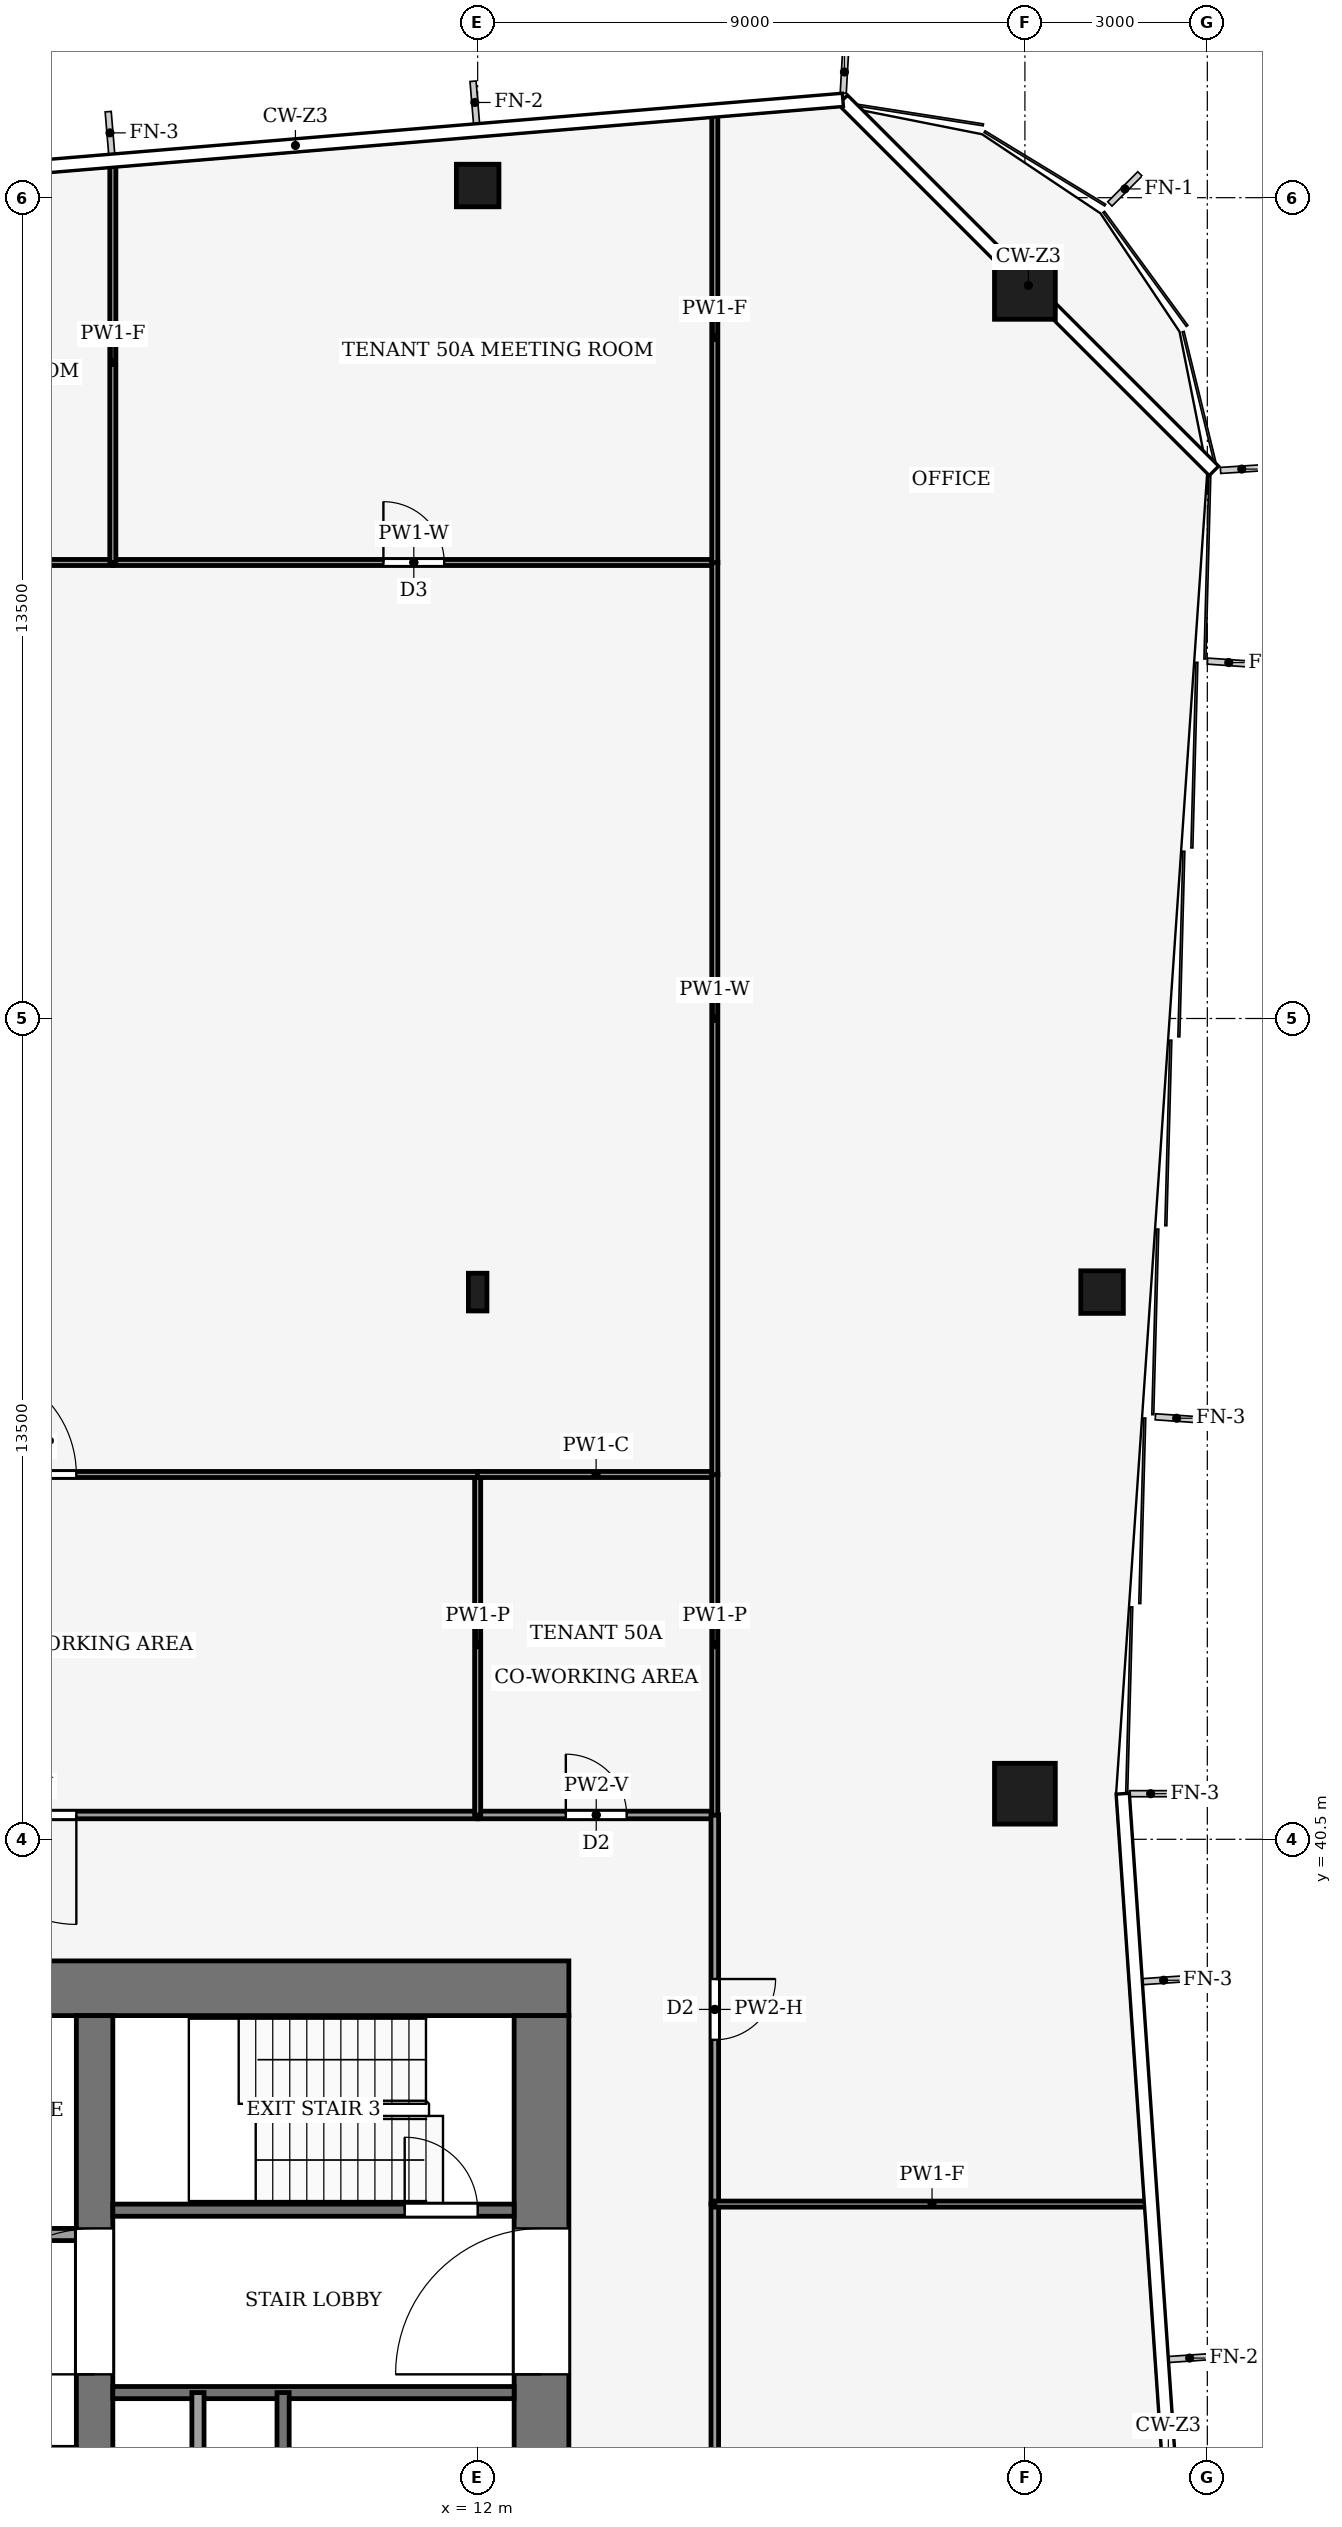
"""IFC4 building model, lengths in metres.
Left out: names, types, materials, properties, quantities, classifications, styles, units other than length and angle.
Written with IfcOpenShell. Run it as: python <this file> out.ifc"""

import sys

from ifc_helpers import new_model, si_unit, direction, frame, frame_2d, origin, origin_2d, place, context, subcontext, project, spatial, rectangle, hollow_rectangle, i_section, extrude, element, fill, save


model = new_model("IFC4")
c1 = context("Model", 3, precision=1e-05, world=origin(), true_north=direction((0.0, 1.0)))
c2 = subcontext(c1, "Body", "Model", "MODEL_VIEW")
j1 = project(units=[si_unit("LENGTHUNIT", "METRE"), si_unit("PLANEANGLEUNIT", "RADIAN")], contexts=[c1])
p1 = place(None, origin())
s1 = spatial("IfcSite", under=j1, at=p1, CompositionType="ELEMENT")
p2 = place(p1, origin())
s2 = spatial("IfcBuilding", under=s1, at=p2, CompositionType="ELEMENT")
p3 = place(p2, frame((0.0, 0.0, 218.0)))
s3 = spatial("IfcBuildingStorey", under=s2, at=p3, CompositionType="ELEMENT", Elevation=218.0)
p4 = place(p3, frame((-13.5, 38.05, -0.13), z_axis=(0.0, 0.0, 1.0), x_axis=(1.0, 0.0, 0.0)))
e1 = element("IfcWall", 1, at=p4, inside=s3, PredefinedType="SHEAR", context=c2, shape_type="SweptSolid", body=[
    extrude(rectangle(XDim=27.0, YDim=0.9, at=frame_2d((13.5, 0.0))), origin(), (0.0, 0.0, 1.0), 4.0),
])
p5 = place(p3, frame((13.05, 18.4, -0.13), z_axis=(0.0, 0.0, 1.0), x_axis=(0.0, 1.0, 0.0)))
e2 = element("IfcWall", 2, at=p5, inside=s3, PredefinedType="SHEAR", context=c2, shape_type="SweptSolid", body=[
    extrude(rectangle(XDim=19.2, YDim=0.9, at=frame_2d((9.6, 0.0))), origin(), (0.0, 0.0, 1.0), 4.0),
])
p6 = place(p5, frame((2.8, 0.0, 0.13)))
e3 = element("IfcOpeningElement", 3, at=p6, cuts=e2, PredefinedType="OPENING", context=c2, shape_type="SweptSolid", body=[
    extrude(rectangle(XDim=2.4, YDim=2.4, at=frame_2d((1.2, 1.2))), frame((0.0, 0.46, 0.0), z_axis=(0.0, -1.0, 0.0), x_axis=(1.0, 0.0, 0.0)), (0.0, 0.0, 1.0), 0.92),
])
p7 = place(p5, frame((13.3, 0.0, 0.13)))
e4 = element("IfcOpeningElement", 4, at=p7, cuts=e2, PredefinedType="OPENING", context=c2, shape_type="SweptSolid", body=[
    extrude(rectangle(XDim=2.4, YDim=2.4, at=frame_2d((1.2, 1.2))), frame((0.0, 0.46, 0.0), z_axis=(0.0, -1.0, 0.0), x_axis=(1.0, 0.0, 0.0)), (0.0, 0.0, 1.0), 0.92),
])
p8 = place(p3, frame((5.7, 18.4, -0.13), z_axis=(0.0, 0.0, 1.0), x_axis=(0.0, 1.0, 0.0)))
e5 = element("IfcWall", 5, at=p8, inside=s3, PredefinedType="SHEAR", context=c2, shape_type="SweptSolid", body=[
    extrude(rectangle(XDim=19.2, YDim=0.6, at=frame_2d((9.6, 0.0))), origin(), (0.0, 0.0, 1.0), 4.0),
])
p9 = place(p8, frame((8.35, 0.0, 0.13)))
e6 = element("IfcOpeningElement", 6, at=p9, cuts=e5, PredefinedType="OPENING", context=c2, shape_type="SweptSolid", body=[
    extrude(rectangle(XDim=0.9, YDim=2.1, at=frame_2d((0.45, 1.05))), frame((0.0, 0.31, 0.0), z_axis=(0.0, -1.0, 0.0), x_axis=(1.0, 0.0, 0.0)), (0.0, 0.0, 1.0), 0.62),
])
p10 = place(p8, frame((13.3, 0.0, 0.13)))
e7 = element("IfcOpeningElement", 7, at=p10, cuts=e5, PredefinedType="OPENING", context=c2, shape_type="SweptSolid", body=[
    extrude(rectangle(XDim=2.4, YDim=2.4, at=frame_2d((1.2, 1.2))), frame((0.0, 0.31, 0.0), z_axis=(0.0, -1.0, 0.0), x_axis=(1.0, 0.0, 0.0)), (0.0, 0.0, 1.0), 0.62),
])
for number, where, z_axis, x_axis in (
    (8, (21.0, 66.0, 0.0), (0.0, 0.0, 1.0), (1.0, 0.0, 0.0)),
    (9, (21.0, 41.25, 0.0), (0.0, 0.0, 1.0), (1.0, 0.0, 0.0)),
):
    element("IfcColumn", number, at=place(p3, frame(where, z_axis=z_axis, x_axis=x_axis)), inside=s3, PredefinedType="COLUMN", context=c2, shape_type="SweptSolid", body=[
        extrude(hollow_rectangle(XDim=1.0, YDim=1.0, WallThickness=0.06, at=origin_2d()), origin(), (0.0, 0.0, 1.0), 4.0),
    ])
for number, where, z_axis, x_axis in (
    (10, (12.0, 67.7, 0.0), (0.0, 0.0, 1.0), (1.0, 0.0, 0.0)),
    (11, (22.269, 49.5, 0.0), (0.0, 0.0, 1.0), (1.0, 0.0, 0.0)),
):
    element("IfcColumn", number, at=place(p3, frame(where, z_axis=z_axis, x_axis=x_axis)), inside=s3, PredefinedType="COLUMN", context=c2, shape_type="SweptSolid", body=[
        extrude(hollow_rectangle(XDim=0.7, YDim=0.7, WallThickness=0.03, at=origin_2d()), origin(), (0.0, 0.0, 1.0), 4.0),
    ])
p11 = place(p3, frame((12.0, 49.5, 0.0), z_axis=(0.0, 0.0, 1.0), x_axis=(1.0, 0.0, 0.0)))
e12 = element("IfcColumn", 12, at=p11, inside=s3, PredefinedType="COLUMN", context=c2, shape_type="SweptSolid", body=[
    extrude(i_section(OverallWidth=0.305, OverallDepth=0.62, WebThickness=0.021, FlangeThickness=0.04, FilletRadius=0.027, at=origin_2d()), origin(), (0.0, 0.0, 1.0), 4.0),
])
p12 = place(p3, frame((6.0, 31.4, 0.0), z_axis=(0.0, 0.0, 1.0), x_axis=(1.0, 0.0, 0.0)))
e13 = element("IfcWall", 13, at=p12, inside=s3, PredefinedType="PARTITIONING", context=c2, shape_type="SweptSolid", body=[
    extrude(rectangle(XDim=6.6, YDim=0.2, at=frame_2d((3.3, 0.0))), origin(), (0.0, 0.0, 1.0), 3.87),
])
p13 = place(p3, frame((-5.4, 34.0, 0.0), z_axis=(0.0, 0.0, 1.0), x_axis=(1.0, 0.0, 0.0)))
e14 = element("IfcWall", 14, at=p13, inside=s3, PredefinedType="PARTITIONING", context=c2, shape_type="SweptSolid", body=[
    extrude(rectangle(XDim=10.8, YDim=0.2, at=frame_2d((5.4, 0.0))), origin(), (0.0, 0.0, 1.0), 3.87),
])
p14 = place(p13, frame((6.15, 0.0, 0.0)))
e15 = element("IfcOpeningElement", 15, at=p14, cuts=e14, PredefinedType="OPENING", context=c2, shape_type="SweptSolid", body=[
    extrude(rectangle(XDim=1.2, YDim=2.2, at=frame_2d((0.6, 1.1))), frame((0.0, 0.11, 0.0), z_axis=(0.0, -1.0, 0.0), x_axis=(1.0, 0.0, 0.0)), (0.0, 0.0, 1.0), 0.22),
])
p15 = place(p13, frame((8.95, 0.0, 0.0)))
e16 = element("IfcOpeningElement", 16, at=p15, cuts=e14, PredefinedType="OPENING", context=c2, shape_type="SweptSolid", body=[
    extrude(rectangle(XDim=1.0, YDim=2.1, at=frame_2d((0.5, 1.05))), frame((0.0, 0.11, 0.0), z_axis=(0.0, -1.0, 0.0), x_axis=(1.0, 0.0, 0.0)), (0.0, 0.0, 1.0), 0.22),
])
p16 = place(p3, frame((6.0, 34.4, 0.0), z_axis=(0.0, 0.0, 1.0), x_axis=(1.0, 0.0, 0.0)))
e17 = element("IfcWall", 17, at=p16, inside=s3, PredefinedType="PARTITIONING", context=c2, shape_type="SweptSolid", body=[
    extrude(rectangle(XDim=6.6, YDim=0.2, at=frame_2d((3.3, 0.0))), origin(), (0.0, 0.0, 1.0), 3.87),
])
p17 = place(p16, frame((4.8, 0.0, 0.0)))
e18 = element("IfcOpeningElement", 18, at=p17, cuts=e17, PredefinedType="OPENING", context=c2, shape_type="SweptSolid", body=[
    extrude(rectangle(XDim=1.2, YDim=2.2, at=frame_2d((0.6, 1.1))), frame((0.0, 0.11, 0.0), z_axis=(0.0, -1.0, 0.0), x_axis=(1.0, 0.0, 0.0)), (0.0, 0.0, 1.0), 0.22),
])
for number, where, z_axis, x_axis in (
    (19, (7.4, 24.0, 0.0), (0.0, 0.0, 1.0), (0.0, 1.0, 0.0)),
    (20, (8.8, 24.0, 0.0), (0.0, 0.0, 1.0), (0.0, 1.0, 0.0)),
):
    element("IfcWall", number, at=place(p3, frame(where, z_axis=z_axis, x_axis=x_axis)), inside=s3, PredefinedType="PARTITIONING", context=c2, shape_type="SweptSolid", body=[
        extrude(rectangle(XDim=7.4, YDim=0.2, at=frame_2d((3.7, 0.0))), origin(), (0.0, 0.0, 1.0), 3.87),
    ])
p18 = place(p3, frame((12.0, 40.9, 0.0), z_axis=(0.0, 0.0, 1.0), x_axis=(-1.0, 0.0, 0.0)))
e21 = element("IfcWall", 21, at=p18, inside=s3, PredefinedType="PARTITIONING", context=c2, shape_type="SweptSolid", body=[
    extrude(rectangle(XDim=15.0, YDim=0.125, at=frame_2d((7.5, 0.0))), origin(), (0.0, 0.0, 1.0), 3.44),
])
p19 = place(p18, frame((6.6, 0.0, 0.0)))
e22 = element("IfcOpeningElement", 22, at=p19, cuts=e21, PredefinedType="OPENING", context=c2, shape_type="SweptSolid", body=[
    extrude(rectangle(XDim=1.8, YDim=2.1, at=frame_2d((0.9, 1.05))), frame((0.0, 0.073, 0.0), z_axis=(0.0, -1.0, 0.0), x_axis=(1.0, 0.0, 0.0)), (0.0, 0.0, 1.0), 0.145),
])
p20 = place(p3, frame((12.0, 40.9, 0.0), z_axis=(0.0, 0.0, 1.0), x_axis=(1.0, 0.0, 0.0)))
e23 = element("IfcWall", 23, at=p20, inside=s3, PredefinedType="PARTITIONING", context=c2, shape_type="SweptSolid", body=[
    extrude(rectangle(XDim=3.9, YDim=0.125, at=frame_2d((1.95, 0.0))), origin(), (0.0, 0.0, 1.0), 3.44),
])
p21 = place(p20, frame((1.45, 0.0, 0.0)))
e24 = element("IfcOpeningElement", 24, at=p21, cuts=e23, PredefinedType="OPENING", context=c2, shape_type="SweptSolid", body=[
    extrude(rectangle(XDim=1.0, YDim=2.1, at=frame_2d((0.5, 1.05))), frame((0.0, 0.073, 0.0), z_axis=(0.0, -1.0, 0.0), x_axis=(1.0, 0.0, 0.0)), (0.0, 0.0, 1.0), 0.145),
])
p22 = place(p3, frame((15.9, 22.5, 0.0), z_axis=(0.0, 0.0, 1.0), x_axis=(0.0, 1.0, 0.0)))
e25 = element("IfcWall", 25, at=p22, inside=s3, PredefinedType="PARTITIONING", context=c2, shape_type="SweptSolid", body=[
    extrude(rectangle(XDim=12.0, YDim=0.125, at=frame_2d((6.0, 0.0))), origin(), (0.0, 0.0, 1.0), 3.44),
])
p23 = place(p22, frame((5.1, 0.0, 0.0)))
e26 = element("IfcOpeningElement", 26, at=p23, cuts=e25, PredefinedType="OPENING", context=c2, shape_type="SweptSolid", body=[
    extrude(rectangle(XDim=1.8, YDim=2.1, at=frame_2d((0.9, 1.05))), frame((0.0, 0.073, 0.0), z_axis=(0.0, -1.0, 0.0), x_axis=(1.0, 0.0, 0.0)), (0.0, 0.0, 1.0), 0.145),
])
p24 = place(p3, frame((15.9, 40.904, 0.0), z_axis=(0.0, 0.0, 1.0), x_axis=(0.0, -1.0, 0.0)))
e27 = element("IfcWall", 27, at=p24, inside=s3, PredefinedType="PARTITIONING", context=c2, shape_type="SweptSolid", body=[
    extrude(rectangle(XDim=6.404, YDim=0.125, at=frame_2d((3.202, 0.0))), origin(), (0.0, 0.0, 1.0), 3.14),
])
p25 = place(p24, frame((2.702, 0.0, 0.0)))
e28 = element("IfcOpeningElement", 28, at=p25, cuts=e27, PredefinedType="OPENING", context=c2, shape_type="SweptSolid", body=[
    extrude(rectangle(XDim=1.0, YDim=2.1, at=frame_2d((0.5, 1.05))), frame((0.0, 0.073, 0.0), z_axis=(0.0, -1.0, 0.0), x_axis=(1.0, 0.0, 0.0)), (0.0, 0.0, 1.0), 0.145),
])
p26 = place(p3, frame((12.0, 40.9, 0.0), z_axis=(0.0, 0.0, 1.0), x_axis=(0.0, 1.0, 0.0)))
e29 = element("IfcWall", 29, at=p26, inside=s3, PredefinedType="PARTITIONING", context=c2, shape_type="SweptSolid", body=[
    extrude(rectangle(XDim=5.6, YDim=0.1, at=frame_2d((2.8, 0.0))), origin(), (0.0, 0.0, 1.0), 3.44),
])
p27 = place(p3, frame((-3.004, 46.5, 0.0), z_axis=(0.0, 0.0, 1.0), x_axis=(1.0, 0.0, 0.0)))
e30 = element("IfcWall", 30, at=p27, inside=s3, PredefinedType="PARTITIONING", context=c2, shape_type="SweptSolid", body=[
    extrude(rectangle(XDim=15.008, YDim=0.1, at=frame_2d((7.504, 0.0))), origin(), (0.0, 0.0, 1.0), 3.44),
])
p28 = place(p27, frame((6.604, 0.0, 0.0)))
e31 = element("IfcOpeningElement", 31, at=p28, cuts=e30, PredefinedType="OPENING", context=c2, shape_type="SweptSolid", body=[
    extrude(rectangle(XDim=1.8, YDim=2.1, at=frame_2d((0.9, 1.05))), frame((0.0, 0.06, 0.0), z_axis=(0.0, -1.0, 0.0), x_axis=(1.0, 0.0, 0.0)), (0.0, 0.0, 1.0), 0.12),
])
p29 = place(p3, frame((15.9, 46.5, 0.0), z_axis=(0.0, 0.0, 1.0), x_axis=(-1.0, 0.0, 0.0)))
e32 = element("IfcWall", 32, at=p29, inside=s3, PredefinedType="PARTITIONING", context=c2, shape_type="SweptSolid", body=[
    extrude(rectangle(XDim=3.904, YDim=0.1, at=frame_2d((1.952, 0.0))), origin(), (0.0, 0.0, 1.0), 3.87),
])
p30 = place(p3, frame((15.9, 40.896, 0.0), z_axis=(0.0, 0.0, 1.0), x_axis=(0.0, 1.0, 0.0)))
e33 = element("IfcWall", 33, at=p30, inside=s3, PredefinedType="PARTITIONING", context=c2, shape_type="SweptSolid", body=[
    extrude(rectangle(XDim=5.608, YDim=0.1, at=frame_2d((2.804, 0.0))), origin(), (0.0, 0.0, 1.0), 3.44),
])
p31 = place(p3, frame((-6.0, 61.5, 0.0), z_axis=(0.0, 0.0, 1.0), x_axis=(1.0, 0.0, 0.0)))
e34 = element("IfcWall", 34, at=p31, inside=s3, PredefinedType="PARTITIONING", context=c2, shape_type="SweptSolid", body=[
    extrude(rectangle(XDim=12.0, YDim=0.1, at=frame_2d((6.0, 0.0))), origin(), (0.0, 0.0, 1.0), 3.24),
])
p32 = place(p31, frame((5.5, 0.0, 0.0)))
e35 = element("IfcOpeningElement", 35, at=p32, cuts=e34, PredefinedType="OPENING", context=c2, shape_type="SweptSolid", body=[
    extrude(rectangle(XDim=1.0, YDim=2.1, at=frame_2d((0.5, 1.05))), frame((0.0, 0.06, 0.0), z_axis=(0.0, -1.0, 0.0), x_axis=(1.0, 0.0, 0.0)), (0.0, 0.0, 1.0), 0.12),
])
p33 = place(p3, frame((6.0, 61.5, 0.0), z_axis=(0.0, 0.0, 1.0), x_axis=(1.0, 0.0, 0.0)))
e36 = element("IfcWall", 36, at=p33, inside=s3, PredefinedType="PARTITIONING", context=c2, shape_type="SweptSolid", body=[
    extrude(rectangle(XDim=9.9, YDim=0.1, at=frame_2d((4.95, 0.0))), origin(), (0.0, 0.0, 1.0), 3.24),
])
p34 = place(p33, frame((4.45, 0.0, 0.0)))
e37 = element("IfcOpeningElement", 37, at=p34, cuts=e36, PredefinedType="OPENING", context=c2, shape_type="SweptSolid", body=[
    extrude(rectangle(XDim=1.0, YDim=2.1, at=frame_2d((0.5, 1.05))), frame((0.0, 0.06, 0.0), z_axis=(0.0, -1.0, 0.0), x_axis=(1.0, 0.0, 0.0)), (0.0, 0.0, 1.0), 0.12),
])
p35 = place(p3, frame((15.9, 46.496, 0.0), z_axis=(0.0, 0.0, 1.0), x_axis=(0.0, 1.0, 0.0)))
e38 = element("IfcWall", 38, at=p35, inside=s3, PredefinedType="PARTITIONING", context=c2, shape_type="SweptSolid", body=[
    extrude(rectangle(XDim=15.008, YDim=0.1, at=frame_2d((7.504, 0.0))), origin(), (0.0, 0.0, 1.0), 3.24),
])
p36 = place(p3, frame((6.0, 61.5, 0.0), z_axis=(0.0, 0.0, 1.0), x_axis=(0.0, 1.0, 0.0)))
e39 = element("IfcWall", 39, at=p36, inside=s3, PredefinedType="PARTITIONING", context=c2, shape_type="SweptSolid", body=[
    extrude(rectangle(XDim=6.58, YDim=0.1, at=frame_2d((3.29, 0.0))), origin(), (0.0, 0.0, 1.0), 3.04),
])
p37 = place(p3, frame((15.9, 61.496, 0.0), z_axis=(0.0, 0.0, 1.0), x_axis=(0.0, 1.0, 0.0)))
e40 = element("IfcWall", 40, at=p37, inside=s3, PredefinedType="PARTITIONING", context=c2, shape_type="SweptSolid", body=[
    extrude(rectangle(XDim=7.409, YDim=0.1, at=frame_2d((3.705, 0.0))), origin(), (0.0, 0.0, 1.0), 3.04),
])
p38 = place(p3, frame((23.045, 34.5, 0.0), z_axis=(0.0, 0.0, 1.0), x_axis=(-1.0, 0.0, 0.0)))
e41 = element("IfcWall", 41, at=p38, inside=s3, PredefinedType="PARTITIONING", context=c2, shape_type="SweptSolid", body=[
    extrude(rectangle(XDim=7.146, YDim=0.1, at=frame_2d((3.573, 0.0))), origin(), (0.0, 0.0, 1.0), 3.04),
])
p39 = place(p17, origin())
e42 = element("IfcDoor", 42, at=p39, inside=s3, OperationType="SINGLE_SWING_RIGHT", PredefinedType="DOOR", context=c2, shape_type="SweptSolid", body=[
    extrude(rectangle(XDim=1.2, YDim=2.2, at=frame_2d((0.6, 1.1))), frame((0.0, 0.025, 0.0), z_axis=(0.0, -1.0, 0.0), x_axis=(1.0, 0.0, 0.0)), (0.0, 0.0, 1.0), 0.05),
])
fill(e18, e42)
p40 = place(p10, origin())
e43 = element("IfcDoor", 43, at=p40, inside=s3, OperationType="DOUBLE_DOOR_SINGLE_SWING", PredefinedType="DOOR", context=c2, shape_type="SweptSolid", body=[
    extrude(rectangle(XDim=2.4, YDim=2.4, at=frame_2d((1.2, 1.2))), frame((0.0, 0.025, 0.0), z_axis=(0.0, -1.0, 0.0), x_axis=(1.0, 0.0, 0.0)), (0.0, 0.0, 1.0), 0.05),
])
fill(e7, e43)
p41 = place(p7, origin())
e44 = element("IfcDoor", 44, at=p41, inside=s3, OperationType="DOUBLE_DOOR_SINGLE_SWING", PredefinedType="DOOR", context=c2, shape_type="SweptSolid", body=[
    extrude(rectangle(XDim=2.4, YDim=2.4, at=frame_2d((1.2, 1.2))), frame((0.0, 0.025, 0.0), z_axis=(0.0, -1.0, 0.0), x_axis=(1.0, 0.0, 0.0)), (0.0, 0.0, 1.0), 0.05),
])
fill(e4, e44)
p42 = place(p19, origin())
e45 = element("IfcDoor", 45, at=p42, inside=s3, OperationType="DOUBLE_DOOR_SINGLE_SWING", PredefinedType="DOOR", context=c2, shape_type="SweptSolid", body=[
    extrude(rectangle(XDim=1.8, YDim=2.1, at=frame_2d((0.9, 1.05))), frame((0.0, 0.025, 0.0), z_axis=(0.0, -1.0, 0.0), x_axis=(1.0, 0.0, 0.0)), (0.0, 0.0, 1.0), 0.05),
])
fill(e22, e45)
p43 = place(p21, origin())
e46 = element("IfcDoor", 46, at=p43, inside=s3, OperationType="SINGLE_SWING_LEFT", PredefinedType="DOOR", context=c2, shape_type="SweptSolid", body=[
    extrude(rectangle(XDim=1.0, YDim=2.1, at=frame_2d((0.5, 1.05))), frame((0.0, 0.025, 0.0), z_axis=(0.0, -1.0, 0.0), x_axis=(1.0, 0.0, 0.0)), (0.0, 0.0, 1.0), 0.05),
])
fill(e24, e46)
p44 = place(p25, origin())
e47 = element("IfcDoor", 47, at=p44, inside=s3, OperationType="SINGLE_SWING_RIGHT", PredefinedType="DOOR", context=c2, shape_type="SweptSolid", body=[
    extrude(rectangle(XDim=1.0, YDim=2.1, at=frame_2d((0.5, 1.05))), frame((0.0, 0.025, 0.0), z_axis=(0.0, -1.0, 0.0), x_axis=(1.0, 0.0, 0.0)), (0.0, 0.0, 1.0), 0.05),
])
fill(e28, e47)
p45 = place(p28, origin())
e48 = element("IfcDoor", 48, at=p45, inside=s3, OperationType="DOUBLE_DOOR_SINGLE_SWING", PredefinedType="DOOR", context=c2, shape_type="SweptSolid", body=[
    extrude(rectangle(XDim=1.8, YDim=2.1, at=frame_2d((0.9, 1.05))), frame((0.0, 0.025, 0.0), z_axis=(0.0, -1.0, 0.0), x_axis=(1.0, 0.0, 0.0)), (0.0, 0.0, 1.0), 0.05),
])
fill(e31, e48)
p46 = place(p34, origin())
e49 = element("IfcDoor", 49, at=p46, inside=s3, OperationType="SINGLE_SWING_LEFT", PredefinedType="DOOR", context=c2, shape_type="SweptSolid", body=[
    extrude(rectangle(XDim=1.0, YDim=2.1, at=frame_2d((0.5, 1.05))), frame((0.0, 0.025, 0.0), z_axis=(0.0, -1.0, 0.0), x_axis=(1.0, 0.0, 0.0)), (0.0, 0.0, 1.0), 0.05),
])
fill(e37, e49)
save(model, sys.argv[1])
